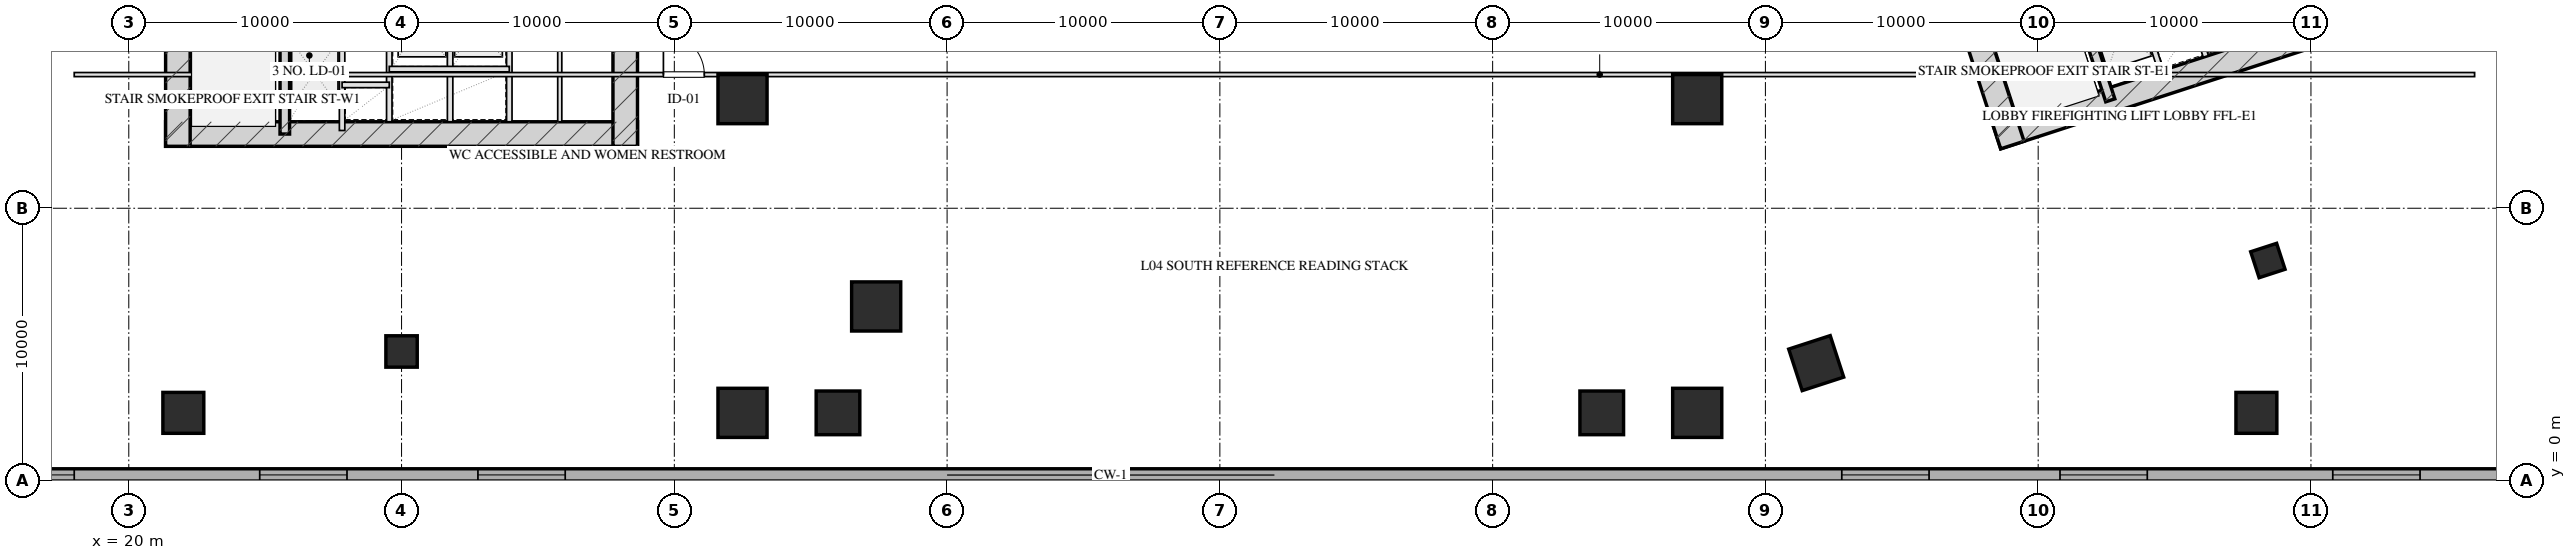
"""IFC4 building model, lengths in metres.
Left out: names, types, materials, properties, quantities, classifications, styles, units other than length and angle.
Written with IfcOpenShell. Run it as: python <this file> out.ifc"""

import sys

from ifc_helpers import new_model, si_unit, direction, frame, frame_2d, origin, origin_2d, place, context, subcontext, project, spatial, rectangle, hollow_rectangle, extrude, element, fill, save


model = new_model("IFC4")
c1 = context("Model", 3, precision=1e-05, world=origin(), true_north=direction((0.0, 1.0)))
c2 = subcontext(c1, "Body", "Model", "MODEL_VIEW")
j1 = project(units=[si_unit("LENGTHUNIT", "METRE"), si_unit("PLANEANGLEUNIT", "RADIAN")], contexts=[c1])
p1 = place(None, origin())
s1 = spatial("IfcSite", under=j1, at=p1, CompositionType="ELEMENT")
p2 = place(p1, origin())
s2 = spatial("IfcBuilding", under=s1, at=p2, CompositionType="ELEMENT")
p3 = place(p2, frame((0.0, 0.0, 22.0)))
s3 = spatial("IfcBuildingStorey", under=s2, at=p3, CompositionType="ELEMENT", Elevation=22.0)
p4 = place(p3, frame((21.35, 12.72, 0.0), z_axis=(0.0, 0.0, 1.0), x_axis=(1.0, 0.0, 0.0)))
e1 = element("IfcWall", 1, at=p4, inside=s3, PredefinedType="SHEAR", context=c2, shape_type="SweptSolid", body=[
    extrude(rectangle(XDim=17.3, YDim=0.9, at=frame_2d((8.65, 0.0))), origin(), (0.0, 0.0, 1.0), 4.0),
])
for number, where, z_axis, x_axis in (
    (2, (21.8, 22.05, 0.0), (0.0, 0.0, 1.0), (0.0, -1.0, 0.0)),
    (3, (38.2, 22.05, 0.0), (0.0, 0.0, 1.0), (0.0, -1.0, 0.0)),
):
    element("IfcWall", number, at=place(p3, frame(where, z_axis=z_axis, x_axis=x_axis)), inside=s3, PredefinedType="SHEAR", context=c2, shape_type="SweptSolid", body=[
        extrude(rectangle(XDim=9.78, YDim=0.9, at=frame_2d((4.89, 0.0))), origin(), (0.0, 0.0, 1.0), 4.0),
    ])
p5 = place(p3, frame((25.72, 19.7, 0.0), z_axis=(0.0, 0.0, 1.0), x_axis=(0.0, -1.0, 0.0)))
e4 = element("IfcWall", 4, at=p5, inside=s3, PredefinedType="SHEAR", context=c2, shape_type="SweptSolid", body=[
    extrude(rectangle(XDim=6.98, YDim=0.35, at=frame_2d((3.49, 0.0))), origin(), (0.0, 0.0, 1.0), 4.0),
])
p6 = place(p3, frame((88.487, 12.605, 0.0), z_axis=(0.0, 0.0, 1.0), x_axis=(0.951055016115, 0.309021611416, 0.0)))
e5 = element("IfcWall", 5, at=p6, inside=s3, PredefinedType="SHEAR", context=c2, shape_type="SweptSolid", body=[
    extrude(rectangle(XDim=16.7, YDim=0.9, at=frame_2d((8.35, 0.0))), origin(), (0.0, 0.0, 1.0), 4.0),
])
p7 = place(p3, frame((86.032, 21.618, 0.0), z_axis=(0.0, 0.0, 1.0), x_axis=(0.30901438634, -0.951057363693, 0.0)))
e6 = element("IfcWall", 6, at=p7, inside=s3, PredefinedType="SHEAR", context=c2, shape_type="SweptSolid", body=[
    extrude(rectangle(XDim=9.78, YDim=0.9, at=frame_2d((4.89, 0.0))), origin(), (0.0, 0.0, 1.0), 4.0),
])
p8 = place(p3, frame((90.486, 20.594, 0.0), z_axis=(0.0, 0.0, 1.0), x_axis=(0.309020428229, -0.951055400562, 0.0)))
e7 = element("IfcWall", 7, at=p8, inside=s3, PredefinedType="SHEAR", context=c2, shape_type="SweptSolid", body=[
    extrude(rectangle(XDim=6.98, YDim=0.35, at=frame_2d((3.49, 0.0))), origin(), (0.0, 0.0, 1.0), 4.0),
])
p9 = place(p3, frame((22.0, 2.5, 0.0), z_axis=(0.0, 0.0, 1.0), x_axis=(1.0, 0.0, 0.0)))
e8 = element("IfcColumn", 8, at=p9, inside=s3, PredefinedType="COLUMN", context=c2, shape_type="SweptSolid", body=[
    extrude(rectangle(XDim=1.5, YDim=1.5, at=origin_2d()), origin(), (0.0, 0.0, 1.0), 4.001),
])
for number, where, z_axis, x_axis in (
    (9, (42.5, 2.5, 0.0), (0.0, 0.0, 1.0), (1.0, 0.0, 0.0)),
    (10, (42.5, 14.0, 0.0), (0.0, 0.0, 1.0), (1.0, 0.0, 0.0)),
    (11, (77.5, 2.5, 0.0), (0.0, 0.0, 1.0), (1.0, 0.0, 0.0)),
    (12, (77.5, 14.0, 0.0), (0.0, 0.0, 1.0), (1.0, 0.0, 0.0)),
):
    element("IfcColumn", number, at=place(p3, frame(where, z_axis=z_axis, x_axis=x_axis)), inside=s3, PredefinedType="COLUMN", context=c2, shape_type="SweptSolid", body=[
        extrude(hollow_rectangle(XDim=1.8, YDim=1.8, WallThickness=0.06, at=origin_2d()), origin(), (0.0, 0.0, 1.0), 4.001),
    ])
p10 = place(p3, frame((98.0, 2.5, 0.0), z_axis=(0.0, 0.0, 1.0), x_axis=(1.0, 0.0, 0.0)))
e13 = element("IfcColumn", 13, at=p10, inside=s3, PredefinedType="COLUMN", context=c2, shape_type="SweptSolid", body=[
    extrude(rectangle(XDim=1.5, YDim=1.5, at=origin_2d()), origin(), (0.0, 0.0, 1.0), 4.001),
])
for number, where, z_axis, x_axis in (
    (14, (46.0, 2.5, 0.0), (0.0, 0.0, 1.0), (1.0, 0.0, 0.0)),
    (15, (74.0, 2.5, 0.0), (0.0, 0.0, 1.0), (1.0, 0.0, 0.0)),
):
    element("IfcColumn", number, at=place(p3, frame(where, z_axis=z_axis, x_axis=x_axis)), inside=s3, PredefinedType="COLUMN", context=c2, shape_type="SweptSolid", body=[
        extrude(hollow_rectangle(XDim=1.6, YDim=1.6, WallThickness=0.055, at=origin_2d()), origin(), (0.0, 0.0, 1.0), 4.001),
    ])
p11 = place(p3, frame((47.4, 6.4, 0.0), z_axis=(0.0, 0.0, 1.0), x_axis=(1.0, 0.0, 0.0)))
e16 = element("IfcColumn", 16, at=p11, inside=s3, PredefinedType="COLUMN", context=c2, shape_type="SweptSolid", body=[
    extrude(hollow_rectangle(XDim=1.8, YDim=1.8, WallThickness=0.06, at=origin_2d()), origin(), (0.0, 0.0, 1.0), 4.001),
])
p12 = place(p3, frame((30.0, 4.75, 0.0), z_axis=(0.0, 0.0, 1.0), x_axis=(1.0, 0.0, 0.0)))
e17 = element("IfcColumn", 17, at=p12, inside=s3, PredefinedType="COLUMN", context=c2, shape_type="SweptSolid", body=[
    extrude(hollow_rectangle(XDim=1.15, YDim=1.15, WallThickness=0.04, at=origin_2d()), origin(), (0.0, 0.0, 1.0), 4.001),
])
p13 = place(p3, frame((81.863, 4.323, 0.0), z_axis=(0.0, 0.0, 1.0), x_axis=(0.951056516295, 0.309016994375, 0.0)))
e18 = element("IfcColumn", 18, at=p13, inside=s3, PredefinedType="COLUMN", context=c2, shape_type="SweptSolid", body=[
    extrude(hollow_rectangle(XDim=1.6, YDim=1.6, WallThickness=0.055, at=origin_2d()), origin(), (0.0, 0.0, 1.0), 4.001),
])
p14 = place(p3, frame((98.421, 8.084, 0.0), z_axis=(0.0, 0.0, 1.0), x_axis=(0.951056516295, 0.309016994375, 0.0)))
e19 = element("IfcColumn", 19, at=p14, inside=s3, PredefinedType="COLUMN", context=c2, shape_type="SweptSolid", body=[
    extrude(hollow_rectangle(XDim=1.0, YDim=1.0, WallThickness=0.036, at=origin_2d()), origin(), (0.0, 0.0, 1.0), 4.001),
])
p15 = place(p3, frame((120.0, 0.225, 0.0), z_axis=(0.0, 0.0, 1.0), x_axis=(-1.0, 0.0, 0.0)))
e20 = element("IfcWall", 20, at=p15, inside=s3, PredefinedType="SOLIDWALL", context=c2, shape_type="SweptSolid", body=[
    extrude(rectangle(XDim=120.0, YDim=0.45, at=frame_2d((60.0, 0.0))), origin(), (0.0, 0.0, 1.0), 3.78),
])
p16 = place(p15, frame((8.0, 0.0, 0.7)))
e21 = element("IfcOpeningElement", 21, at=p16, cuts=e20, PredefinedType="OPENING", context=c2, shape_type="SweptSolid", body=[
    extrude(rectangle(XDim=3.2, YDim=2.05, at=frame_2d((1.6, 1.025))), frame((0.0, 0.235, 0.0), z_axis=(0.0, -1.0, 0.0), x_axis=(1.0, 0.0, 0.0)), (0.0, 0.0, 1.0), 0.47),
])
p17 = place(p15, frame((16.0, 0.0, 0.7)))
e22 = element("IfcOpeningElement", 22, at=p17, cuts=e20, PredefinedType="OPENING", context=c2, shape_type="SweptSolid", body=[
    extrude(rectangle(XDim=3.2, YDim=2.05, at=frame_2d((1.6, 1.025))), frame((0.0, 0.235, 0.0), z_axis=(0.0, -1.0, 0.0), x_axis=(1.0, 0.0, 0.0)), (0.0, 0.0, 1.0), 0.47),
])
p18 = place(p15, frame((26.0, 0.0, 0.7)))
e23 = element("IfcOpeningElement", 23, at=p18, cuts=e20, PredefinedType="OPENING", context=c2, shape_type="SweptSolid", body=[
    extrude(rectangle(XDim=3.2, YDim=2.05, at=frame_2d((1.6, 1.025))), frame((0.0, 0.235, 0.0), z_axis=(0.0, -1.0, 0.0), x_axis=(1.0, 0.0, 0.0)), (0.0, 0.0, 1.0), 0.47),
])
p19 = place(p15, frame((34.0, 0.0, 0.7)))
e24 = element("IfcOpeningElement", 24, at=p19, cuts=e20, PredefinedType="OPENING", context=c2, shape_type="SweptSolid", body=[
    extrude(rectangle(XDim=3.2, YDim=2.05, at=frame_2d((1.6, 1.025))), frame((0.0, 0.235, 0.0), z_axis=(0.0, -1.0, 0.0), x_axis=(1.0, 0.0, 0.0)), (0.0, 0.0, 1.0), 0.47),
])
p20 = place(p15, frame((84.0, 0.0, 0.7)))
e25 = element("IfcOpeningElement", 25, at=p20, cuts=e20, PredefinedType="OPENING", context=c2, shape_type="SweptSolid", body=[
    extrude(rectangle(XDim=3.2, YDim=2.05, at=frame_2d((1.6, 1.025))), frame((0.0, 0.235, 0.0), z_axis=(0.0, -1.0, 0.0), x_axis=(1.0, 0.0, 0.0)), (0.0, 0.0, 1.0), 0.47),
])
p21 = place(p15, frame((92.0, 0.0, 0.7)))
e26 = element("IfcOpeningElement", 26, at=p21, cuts=e20, PredefinedType="OPENING", context=c2, shape_type="SweptSolid", body=[
    extrude(rectangle(XDim=3.2, YDim=2.05, at=frame_2d((1.6, 1.025))), frame((0.0, 0.235, 0.0), z_axis=(0.0, -1.0, 0.0), x_axis=(1.0, 0.0, 0.0)), (0.0, 0.0, 1.0), 0.47),
])
p22 = place(p15, frame((102.0, 0.0, 0.7)))
e27 = element("IfcOpeningElement", 27, at=p22, cuts=e20, PredefinedType="OPENING", context=c2, shape_type="SweptSolid", body=[
    extrude(rectangle(XDim=3.2, YDim=2.05, at=frame_2d((1.6, 1.025))), frame((0.0, 0.235, 0.0), z_axis=(0.0, -1.0, 0.0), x_axis=(1.0, 0.0, 0.0)), (0.0, 0.0, 1.0), 0.47),
])
p23 = place(p15, frame((110.0, 0.0, 0.7)))
e28 = element("IfcOpeningElement", 28, at=p23, cuts=e20, PredefinedType="OPENING", context=c2, shape_type="SweptSolid", body=[
    extrude(rectangle(XDim=3.2, YDim=2.05, at=frame_2d((1.6, 1.025))), frame((0.0, 0.235, 0.0), z_axis=(0.0, -1.0, 0.0), x_axis=(1.0, 0.0, 0.0)), (0.0, 0.0, 1.0), 0.47),
])
p24 = place(p3, frame((29.55, 21.6, 0.0), z_axis=(0.0, 0.0, 1.0), x_axis=(0.0, -1.0, 0.0)))
e29 = element("IfcWall", 29, at=p24, inside=s3, PredefinedType="PARTITIONING", context=c2, shape_type="SweptSolid", body=[
    extrude(rectangle(XDim=8.43, YDim=0.2, at=frame_2d((4.215, 0.0))), origin(), (0.0, 0.0, 1.0), 3.725),
])
p25 = place(p3, frame((27.82, 16.55, 0.0), z_axis=(0.0, 0.0, 1.0), x_axis=(0.0, -1.0, 0.0)))
e30 = element("IfcWall", 30, at=p25, inside=s3, PredefinedType="PARTITIONING", context=c2, shape_type="SweptSolid", body=[
    extrude(rectangle(XDim=3.7, YDim=0.2, at=frame_2d((1.85, 0.0))), origin(), (0.0, 0.0, 1.0), 3.725),
])
p26 = place(p3, frame((27.82, 14.52, 0.0), z_axis=(0.0, 0.0, 1.0), x_axis=(1.0, 0.0, 0.0)))
e31 = element("IfcWall", 31, at=p26, inside=s3, PredefinedType="PARTITIONING", context=c2, shape_type="SweptSolid", body=[
    extrude(rectangle(XDim=1.73, YDim=0.2, at=frame_2d((0.865, 0.0))), origin(), (0.0, 0.0, 1.0), 3.725),
])
p27 = place(p3, frame((33.95, 21.6, 0.0), z_axis=(0.0, 0.0, 1.0), x_axis=(0.0, -1.0, 0.0)))
e32 = element("IfcWall", 32, at=p27, inside=s3, PredefinedType="PARTITIONING", context=c2, shape_type="SweptSolid", body=[
    extrude(rectangle(XDim=8.43, YDim=0.2, at=frame_2d((4.215, 0.0))), origin(), (0.0, 0.0, 1.0), 3.725),
])
p28 = place(p3, frame((31.78, 18.12, 0.0), z_axis=(0.0, 0.0, 1.0), x_axis=(0.0, -1.0, 0.0)))
e33 = element("IfcWall", 33, at=p28, inside=s3, PredefinedType="PARTITIONING", context=c2, shape_type="SweptSolid", body=[
    extrude(rectangle(XDim=4.95, YDim=0.2, at=frame_2d((2.475, 0.0))), origin(), (0.0, 0.0, 1.0), 3.725),
])
p29 = place(p3, frame((29.55, 15.1, 0.0), z_axis=(0.0, 0.0, 1.0), x_axis=(1.0, 0.0, 0.0)))
e34 = element("IfcWall", 34, at=p29, inside=s3, PredefinedType="PARTITIONING", context=c2, shape_type="SweptSolid", body=[
    extrude(rectangle(XDim=4.4, YDim=0.2, at=frame_2d((2.2, 0.0))), origin(), (0.0, 0.0, 1.0), 3.725),
])
p30 = place(p3, frame((35.8, 18.9, 0.0), z_axis=(0.0, 0.0, 1.0), x_axis=(0.0, -1.0, 0.0)))
e35 = element("IfcWall", 35, at=p30, inside=s3, PredefinedType="PARTITIONING", context=c2, shape_type="SweptSolid", body=[
    extrude(rectangle(XDim=5.73, YDim=0.15, at=frame_2d((2.865, 0.0))), origin(), (0.0, 0.0, 1.0), 3.725),
])
p31 = place(p3, frame((93.542, 23.585, 0.0), z_axis=(0.0, 0.0, 1.0), x_axis=(0.309042196757, -0.951048327176, 0.0)))
e36 = element("IfcWall", 36, at=p31, inside=s3, PredefinedType="PARTITIONING", context=c2, shape_type="SweptSolid", body=[
    extrude(rectangle(XDim=8.43, YDim=0.2, at=frame_2d((4.215, 0.0))), origin(), (0.0, 0.0, 1.0), 3.725),
])
p32 = place(p3, frame((93.457, 18.247, 0.0), z_axis=(0.0, 0.0, 1.0), x_axis=(0.3089935693, -0.951064127245, 0.0)))
e37 = element("IfcWall", 37, at=p32, inside=s3, PredefinedType="PARTITIONING", context=c2, shape_type="SweptSolid", body=[
    extrude(rectangle(XDim=3.7, YDim=0.2, at=frame_2d((1.85, 0.0))), origin(), (0.0, 0.0, 1.0), 3.725),
])
p33 = place(p3, frame((18.0, 14.9, 0.0), z_axis=(0.0, 0.0, 1.0), x_axis=(1.0, 0.0, 0.0)))
e38 = element("IfcWall", 38, at=p33, inside=s3, PredefinedType="PARTITIONING", context=c2, shape_type="SweptSolid", body=[
    extrude(rectangle(XDim=88.0, YDim=0.15, at=frame_2d((44.0, 0.0))), origin(), (0.0, 0.0, 1.0), 2.615),
])
p34 = place(p33, frame((21.6, 0.0, 0.0)))
e39 = element("IfcOpeningElement", 39, at=p34, cuts=e38, PredefinedType="OPENING", context=c2, shape_type="SweptSolid", body=[
    extrude(rectangle(XDim=1.5, YDim=2.05, at=frame_2d((0.75, 1.025))), frame((0.0, 0.085, 0.0), z_axis=(0.0, -1.0, 0.0), x_axis=(1.0, 0.0, 0.0)), (0.0, 0.0, 1.0), 0.17),
])
p35 = place(p17, origin())
e40 = element("IfcWindow", 40, at=p35, inside=s3, PartitioningType="TRIPLE_PANEL_VERTICAL", PredefinedType="WINDOW", context=c2, shape_type="SweptSolid", body=[
    extrude(rectangle(XDim=3.2, YDim=2.05, at=frame_2d((1.6, 1.025))), frame((0.0, 0.03, 0.0), z_axis=(0.0, -1.0, 0.0), x_axis=(1.0, 0.0, 0.0)), (0.0, 0.0, 1.0), 0.06),
])
fill(e22, e40)
p36 = place(p18, origin())
e41 = element("IfcWindow", 41, at=p36, inside=s3, PartitioningType="TRIPLE_PANEL_VERTICAL", PredefinedType="WINDOW", context=c2, shape_type="SweptSolid", body=[
    extrude(rectangle(XDim=3.2, YDim=2.05, at=frame_2d((1.6, 1.025))), frame((0.0, 0.03, 0.0), z_axis=(0.0, -1.0, 0.0), x_axis=(1.0, 0.0, 0.0)), (0.0, 0.0, 1.0), 0.06),
])
fill(e23, e41)
p37 = place(p19, origin())
e42 = element("IfcWindow", 42, at=p37, inside=s3, PartitioningType="TRIPLE_PANEL_VERTICAL", PredefinedType="WINDOW", context=c2, shape_type="SweptSolid", body=[
    extrude(rectangle(XDim=3.2, YDim=2.05, at=frame_2d((1.6, 1.025))), frame((0.0, 0.03, 0.0), z_axis=(0.0, -1.0, 0.0), x_axis=(1.0, 0.0, 0.0)), (0.0, 0.0, 1.0), 0.06),
])
fill(e24, e42)
p38 = place(p20, origin())
e43 = element("IfcWindow", 43, at=p38, inside=s3, PartitioningType="TRIPLE_PANEL_VERTICAL", PredefinedType="WINDOW", context=c2, shape_type="SweptSolid", body=[
    extrude(rectangle(XDim=3.2, YDim=2.05, at=frame_2d((1.6, 1.025))), frame((0.0, 0.03, 0.0), z_axis=(0.0, -1.0, 0.0), x_axis=(1.0, 0.0, 0.0)), (0.0, 0.0, 1.0), 0.06),
])
fill(e25, e43)
p39 = place(p21, origin())
e44 = element("IfcWindow", 44, at=p39, inside=s3, PartitioningType="TRIPLE_PANEL_VERTICAL", PredefinedType="WINDOW", context=c2, shape_type="SweptSolid", body=[
    extrude(rectangle(XDim=3.2, YDim=2.05, at=frame_2d((1.6, 1.025))), frame((0.0, 0.03, 0.0), z_axis=(0.0, -1.0, 0.0), x_axis=(1.0, 0.0, 0.0)), (0.0, 0.0, 1.0), 0.06),
])
fill(e26, e44)
p40 = place(p22, origin())
e45 = element("IfcWindow", 45, at=p40, inside=s3, PartitioningType="TRIPLE_PANEL_VERTICAL", PredefinedType="WINDOW", context=c2, shape_type="SweptSolid", body=[
    extrude(rectangle(XDim=3.2, YDim=2.05, at=frame_2d((1.6, 1.025))), frame((0.0, 0.03, 0.0), z_axis=(0.0, -1.0, 0.0), x_axis=(1.0, 0.0, 0.0)), (0.0, 0.0, 1.0), 0.06),
])
fill(e27, e45)
p41 = place(p34, origin())
e46 = element("IfcDoor", 46, at=p41, inside=s3, OperationType="SINGLE_SWING_LEFT", PredefinedType="DOOR", context=c2, shape_type="SweptSolid", body=[
    extrude(rectangle(XDim=1.5, YDim=2.05, at=frame_2d((0.75, 1.025))), frame((0.0, 0.025, 0.0), z_axis=(0.0, -1.0, 0.0), x_axis=(1.0, 0.0, 0.0)), (0.0, 0.0, 1.0), 0.05),
])
fill(e39, e46)
save(model, sys.argv[1])
